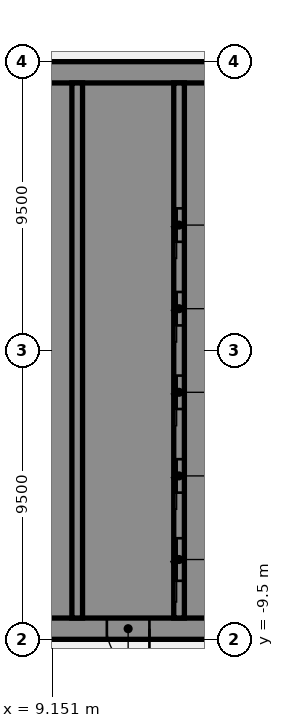
"""IFC4 building model, lengths in metres.
Left out: names, types, materials, properties, quantities, classifications, styles, units other than length and angle.
Written with IfcOpenShell. Run it as: python <this file> out.ifc"""

import sys

from ifc_helpers import new_model, si_unit, direction, frame, frame_2d, origin, place, context, subcontext, project, spatial, polyline, rectangle, outline, extrude, element, fill, save


model = new_model("IFC4")
c1 = context("Model", 3, precision=1e-05, world=origin(), true_north=direction((0.0, 1.0)))
c2 = subcontext(c1, "Body", "Model", "MODEL_VIEW")
j1 = project(units=[si_unit("LENGTHUNIT", "METRE"), si_unit("PLANEANGLEUNIT", "RADIAN")], contexts=[c1])
p1 = place(None, origin())
s1 = spatial("IfcSite", under=j1, at=p1, CompositionType="ELEMENT")
p2 = place(p1, origin())
s2 = spatial("IfcBuilding", under=s1, at=p2, CompositionType="ELEMENT")
p3 = place(p2, frame((0.0, 0.0, 20.0)))
s3 = spatial("IfcBuildingStorey", under=s2, at=p3, CompositionType="ELEMENT", Elevation=20.0)
p4 = place(p3, frame((16.5, -9.15, 0.0), z_axis=(0.0, 0.0, 1.0), x_axis=(-1.0, 0.0, 0.0)))
e1 = element("IfcWall", 1, at=p4, inside=s3, PredefinedType="SHEAR", context=c2, shape_type="SweptSolid", body=[
    extrude(rectangle(XDim=13.0, YDim=0.7, at=frame_2d((6.5, 0.0))), origin(), (0.0, 0.0, 1.0), 4.55),
])
p5 = place(p4, frame((4.15, 0.0, 0.0)))
e2 = element("IfcOpeningElement", 2, at=p5, cuts=e1, PredefinedType="OPENING", context=c2, shape_type="SweptSolid", body=[
    extrude(rectangle(XDim=1.4, YDim=2.1, at=frame_2d((0.7, 1.05))), frame((0.0, 0.36, 0.0), z_axis=(0.0, -1.0, 0.0), x_axis=(1.0, 0.0, 0.0)), (0.0, 0.0, 1.0), 0.72),
])
p6 = place(p4, frame((10.125, 0.0, 0.0)))
e3 = element("IfcOpeningElement", 3, at=p6, cuts=e1, PredefinedType="OPENING", context=c2, shape_type="SweptSolid", body=[
    extrude(rectangle(XDim=1.4, YDim=2.1, at=frame_2d((0.7, 1.05))), frame((0.0, 0.36, 0.0), z_axis=(0.0, -1.0, 0.0), x_axis=(1.0, 0.0, 0.0)), (0.0, 0.0, 1.0), 0.72),
])
p7 = place(p3, origin())
e4 = element("IfcWall", 4, at=p7, inside=s3, PredefinedType="SHEAR", context=c2, shape_type="SweptSolid", body=[
    extrude(outline(polyline([(13.5, -8.8), (15.8, -8.8), (16.5, -8.8), (16.5, 8.8), (15.8, 8.8), (13.5, 8.8), (13.5, 8.125), (15.8, 8.125), (15.8, 5.625), (13.5, 5.625), (13.5, 5.375), (15.8, 5.375), (15.8, 2.875), (13.5, 2.875), (13.5, 2.625), (15.8, 2.625), (15.8, 0.125), (13.5, 0.125), (13.5, -0.125), (15.8, -0.125), (15.8, -2.625), (13.5, -2.625), (13.5, -2.875), (15.8, -2.875), (15.8, -5.375), (13.5, -5.375), (13.5, -5.625), (15.8, -5.625), (15.8, -8.125), (13.5, -8.125), (13.5, -8.8)])), origin(), (0.0, 0.0, 1.0), 4.55),
])
p8 = place(p3, frame((16.5, 9.15, 0.0), z_axis=(0.0, 0.0, 1.0), x_axis=(-1.0, 0.0, 0.0)))
e5 = element("IfcWall", 5, at=p8, inside=s3, PredefinedType="SHEAR", context=c2, shape_type="SweptSolid", body=[
    extrude(rectangle(XDim=13.0, YDim=0.7, at=frame_2d((6.5, 0.0))), origin(), (0.0, 0.0, 1.0), 4.55),
])
p9 = place(p3, origin())
e6 = element("IfcWall", 6, at=p9, inside=s3, PredefinedType="SHEAR", context=c2, shape_type="SweptSolid", body=[
    extrude(outline(polyline([(9.8, -5.375), (7.5, -5.375), (7.5, -2.875), (9.8, -2.875), (9.8, -2.625), (7.5, -2.625), (7.5, -0.125), (9.8, -0.125), (9.8, 0.125), (7.5, 0.125), (7.5, 2.625), (9.8, 2.625), (9.8, 2.875), (7.5, 2.875), (7.5, 5.375), (9.8, 5.375), (9.8, 5.625), (7.5, 5.625), (7.5, 8.125), (9.8, 8.125), (9.8, 8.8), (7.5, 8.8), (7.15, 8.8), (7.15, -5.625), (7.5, -5.625), (9.8, -5.625), (9.8, -5.375)])), origin(), (0.0, 0.0, 1.0), 4.55),
])
p10 = place(p3, origin())
e7 = element("IfcWall", 7, at=p10, inside=s3, PredefinedType="SHEAR", context=c2, shape_type="SweptSolid", body=[
    extrude(outline(polyline([(7.5, -8.125), (7.5, -8.8), (9.8, -8.8), (9.8, -8.125), (9.8, -5.625), (9.55, -5.625), (9.55, -8.125), (7.5, -8.125)])), origin(), (0.0, 0.0, 1.0), 4.55),
])
p11 = place(p3, frame((13.325, -8.8, 0.0), z_axis=(0.0, 0.0, 1.0), x_axis=(0.0, 1.0, 0.0)))
e8 = element("IfcWall", 8, at=p11, inside=s3, PredefinedType="SHEAR", context=c2, shape_type="SweptSolid", body=[
    extrude(rectangle(XDim=17.6, YDim=0.35, at=frame_2d((8.8, 0.0))), origin(), (0.0, 0.0, 1.0), 4.55),
])
p12 = place(p11, frame((1.225, 0.0, 0.0)))
e9 = element("IfcOpeningElement", 9, at=p12, cuts=e8, PredefinedType="OPENING", context=c2, shape_type="SweptSolid", body=[
    extrude(rectangle(XDim=1.4, YDim=2.1, at=frame_2d((0.7, 1.05))), frame((0.0, 0.185, 0.0), z_axis=(0.0, -1.0, 0.0), x_axis=(1.0, 0.0, 0.0)), (0.0, 0.0, 1.0), 0.37),
])
p13 = place(p11, frame((4.125, 0.0, 0.0)))
e10 = element("IfcOpeningElement", 10, at=p13, cuts=e8, PredefinedType="OPENING", context=c2, shape_type="SweptSolid", body=[
    extrude(rectangle(XDim=1.1, YDim=2.1, at=frame_2d((0.55, 1.05))), frame((0.0, 0.185, 0.0), z_axis=(0.0, -1.0, 0.0), x_axis=(1.0, 0.0, 0.0)), (0.0, 0.0, 1.0), 0.37),
])
p14 = place(p11, frame((6.875, 0.0, 0.0)))
e11 = element("IfcOpeningElement", 11, at=p14, cuts=e8, PredefinedType="OPENING", context=c2, shape_type="SweptSolid", body=[
    extrude(rectangle(XDim=1.1, YDim=2.1, at=frame_2d((0.55, 1.05))), frame((0.0, 0.185, 0.0), z_axis=(0.0, -1.0, 0.0), x_axis=(1.0, 0.0, 0.0)), (0.0, 0.0, 1.0), 0.37),
])
p15 = place(p11, frame((9.625, 0.0, 0.0)))
e12 = element("IfcOpeningElement", 12, at=p15, cuts=e8, PredefinedType="OPENING", context=c2, shape_type="SweptSolid", body=[
    extrude(rectangle(XDim=1.1, YDim=2.1, at=frame_2d((0.55, 1.05))), frame((0.0, 0.185, 0.0), z_axis=(0.0, -1.0, 0.0), x_axis=(1.0, 0.0, 0.0)), (0.0, 0.0, 1.0), 0.37),
])
p16 = place(p11, frame((12.375, 0.0, 0.0)))
e13 = element("IfcOpeningElement", 13, at=p16, cuts=e8, PredefinedType="OPENING", context=c2, shape_type="SweptSolid", body=[
    extrude(rectangle(XDim=1.1, YDim=2.1, at=frame_2d((0.55, 1.05))), frame((0.0, 0.185, 0.0), z_axis=(0.0, -1.0, 0.0), x_axis=(1.0, 0.0, 0.0)), (0.0, 0.0, 1.0), 0.37),
])
p17 = place(p3, frame((9.975, -8.8, 0.0), z_axis=(0.0, 0.0, 1.0), x_axis=(0.0, 1.0, 0.0)))
e14 = element("IfcWall", 14, at=p17, inside=s3, PredefinedType="SHEAR", context=c2, shape_type="SweptSolid", body=[
    extrude(rectangle(XDim=17.6, YDim=0.35, at=frame_2d((8.8, 0.0))), origin(), (0.0, 0.0, 1.0), 4.55),
])
p18 = place(p5, origin())
e15 = element("IfcDoor", 15, at=p18, inside=s3, OperationType="SINGLE_SWING_LEFT", PredefinedType="DOOR", context=c2, shape_type="SweptSolid", body=[
    extrude(rectangle(XDim=1.4, YDim=2.1, at=frame_2d((0.7, 1.05))), frame((0.0, 0.025, 0.0), z_axis=(0.0, -1.0, 0.0), x_axis=(1.0, 0.0, 0.0)), (0.0, 0.0, 1.0), 0.05),
])
fill(e2, e15)
p19 = place(p12, origin())
e16 = element("IfcDoor", 16, at=p19, inside=s3, OperationType="SLIDING_TO_LEFT", PredefinedType="DOOR", context=c2, shape_type="SweptSolid", body=[
    extrude(rectangle(XDim=1.4, YDim=2.1, at=frame_2d((0.7, 1.05))), frame((0.0, 0.025, 0.0), z_axis=(0.0, -1.0, 0.0), x_axis=(1.0, 0.0, 0.0)), (0.0, 0.0, 1.0), 0.05),
])
fill(e9, e16)
p20 = place(p13, origin())
e17 = element("IfcDoor", 17, at=p20, inside=s3, OperationType="SLIDING_TO_LEFT", PredefinedType="DOOR", context=c2, shape_type="SweptSolid", body=[
    extrude(rectangle(XDim=1.1, YDim=2.1, at=frame_2d((0.55, 1.05))), frame((0.0, 0.025, 0.0), z_axis=(0.0, -1.0, 0.0), x_axis=(1.0, 0.0, 0.0)), (0.0, 0.0, 1.0), 0.05),
])
fill(e10, e17)
p21 = place(p14, origin())
e18 = element("IfcDoor", 18, at=p21, inside=s3, OperationType="SLIDING_TO_LEFT", PredefinedType="DOOR", context=c2, shape_type="SweptSolid", body=[
    extrude(rectangle(XDim=1.1, YDim=2.1, at=frame_2d((0.55, 1.05))), frame((0.0, 0.025, 0.0), z_axis=(0.0, -1.0, 0.0), x_axis=(1.0, 0.0, 0.0)), (0.0, 0.0, 1.0), 0.05),
])
fill(e11, e18)
p22 = place(p15, origin())
e19 = element("IfcDoor", 19, at=p22, inside=s3, OperationType="SLIDING_TO_LEFT", PredefinedType="DOOR", context=c2, shape_type="SweptSolid", body=[
    extrude(rectangle(XDim=1.1, YDim=2.1, at=frame_2d((0.55, 1.05))), frame((0.0, 0.025, 0.0), z_axis=(0.0, -1.0, 0.0), x_axis=(1.0, 0.0, 0.0)), (0.0, 0.0, 1.0), 0.05),
])
fill(e12, e19)
p23 = place(p16, origin())
e20 = element("IfcDoor", 20, at=p23, inside=s3, OperationType="SLIDING_TO_LEFT", PredefinedType="DOOR", context=c2, shape_type="SweptSolid", body=[
    extrude(rectangle(XDim=1.1, YDim=2.1, at=frame_2d((0.55, 1.05))), frame((0.0, 0.025, 0.0), z_axis=(0.0, -1.0, 0.0), x_axis=(1.0, 0.0, 0.0)), (0.0, 0.0, 1.0), 0.05),
])
fill(e13, e20)
save(model, sys.argv[1])
